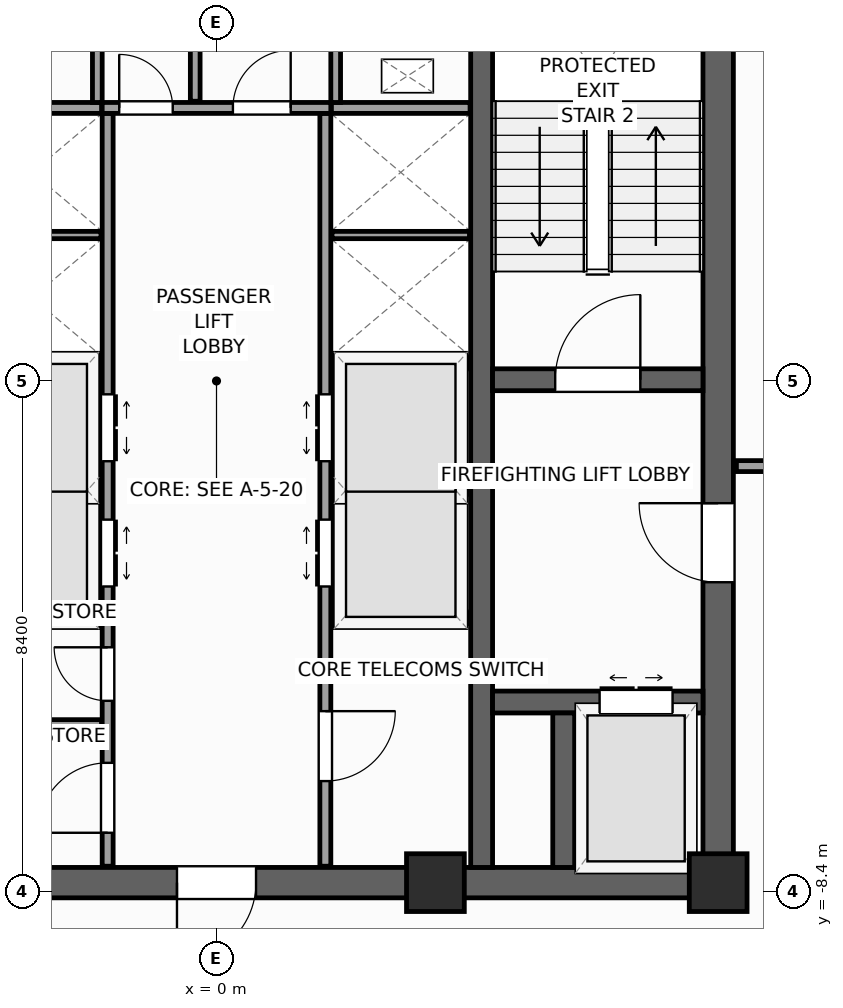
"""IFC4 building model, lengths in metres.
Left out: names, types, materials, properties, quantities, classifications, styles, units other than length and angle.
Written with IfcOpenShell. Run it as: python <this file> out.ifc"""

import sys

from ifc_helpers import new_model, si_unit, direction, frame, frame_2d, origin, origin_2d, place, context, subcontext, project, spatial, rectangle, extrude, source, transform, mapped, element, fill, save


model = new_model("IFC4")
c1 = context("Model", 3, precision=1e-05, world=origin(), true_north=direction((0.0, 1.0)))
c2 = subcontext(c1, "Body", "Model", "MODEL_VIEW")
j1 = project(units=[si_unit("LENGTHUNIT", "METRE"), si_unit("PLANEANGLEUNIT", "RADIAN")], contexts=[c1])
p1 = place(None, origin())
s1 = spatial("IfcSite", under=j1, at=p1, CompositionType="ELEMENT")
p2 = place(p1, origin())
s2 = spatial("IfcBuilding", under=s1, at=p2, CompositionType="ELEMENT")
p3 = place(p2, frame((0.0, 0.0, 221.2)))
s3 = spatial("IfcBuildingStorey", under=s2, at=p3, CompositionType="ELEMENT", Elevation=221.2)
p4 = place(p3, frame((-8.5, -8.25, 0.0), z_axis=(0.0, 0.0, 1.0), x_axis=(1.0, 0.0, 0.0)))
e1 = element("IfcWall", 1, at=p4, inside=s3, PredefinedType="SHEAR", context=c2, shape_type="SweptSolid", body=[
    extrude(rectangle(XDim=17.0, YDim=0.5, at=frame_2d((8.5, 0.0))), origin(), (0.0, 0.0, 1.0), 3.9),
])
p5 = place(p4, frame((7.85, 0.0, 0.0)))
e2 = element("IfcOpeningElement", 2, at=p5, cuts=e1, PredefinedType="OPENING", context=c2, shape_type="SweptSolid", body=[
    extrude(rectangle(XDim=1.3, YDim=2.2, at=frame_2d((0.65, 1.1))), frame((0.0, 0.26, 0.0), z_axis=(0.0, -1.0, 0.0), x_axis=(1.0, 0.0, 0.0)), (0.0, 0.0, 1.0), 0.52),
])
p6 = place(p3, frame((8.25, -8.0, 0.0), z_axis=(0.0, 0.0, 1.0), x_axis=(0.0, 1.0, 0.0)))
e3 = element("IfcWall", 3, at=p6, inside=s3, PredefinedType="SHEAR", context=c2, shape_type="SweptSolid", body=[
    extrude(rectangle(XDim=16.0, YDim=0.5, at=frame_2d((8.0, 0.0))), origin(), (0.0, 0.0, 1.0), 3.9),
])
p7 = place(p6, frame((4.69, 0.0, 0.0)))
e4 = element("IfcOpeningElement", 4, at=p7, cuts=e3, PredefinedType="OPENING", context=c2, shape_type="SweptSolid", body=[
    extrude(rectangle(XDim=1.3, YDim=2.2, at=frame_2d((0.65, 1.1))), frame((0.0, 0.26, 0.0), z_axis=(0.0, -1.0, 0.0), x_axis=(1.0, 0.0, 0.0)), (0.0, 0.0, 1.0), 0.52),
])
p8 = place(p3, frame((4.36, -8.0, 0.0), z_axis=(0.0, 0.0, 1.0), x_axis=(0.0, 1.0, 0.0)))
e5 = element("IfcWall", 5, at=p8, inside=s3, PredefinedType="SHEAR", context=c2, shape_type="SweptSolid", body=[
    extrude(rectangle(XDim=16.0, YDim=0.36, at=frame_2d((8.0, 0.0))), origin(), (0.0, 0.0, 1.0), 3.9),
])
p9 = place(p3, frame((4.54, 0.02, 0.0), z_axis=(0.0, 0.0, 1.0), x_axis=(1.0, 0.0, 0.0)))
e6 = element("IfcWall", 6, at=p9, inside=s3, PredefinedType="SHEAR", context=c2, shape_type="SweptSolid", body=[
    extrude(rectangle(XDim=3.46, YDim=0.36, at=frame_2d((1.73, 0.0))), origin(), (0.0, 0.0, 1.0), 3.9),
])
p10 = place(p9, frame((1.03, 0.0, 0.0)))
e7 = element("IfcOpeningElement", 7, at=p10, cuts=e6, PredefinedType="OPENING", context=c2, shape_type="SweptSolid", body=[
    extrude(rectangle(XDim=1.4, YDim=2.2, at=frame_2d((0.7, 1.1))), frame((0.0, 0.19, 0.0), z_axis=(0.0, -1.0, 0.0), x_axis=(1.0, 0.0, 0.0)), (0.0, 0.0, 1.0), 0.38),
])
p11 = place(p3, frame((4.54, -5.28, 0.0), z_axis=(0.0, 0.0, 1.0), x_axis=(1.0, 0.0, 0.0)))
e8 = element("IfcWall", 8, at=p11, inside=s3, PredefinedType="SHEAR", context=c2, shape_type="SweptSolid", body=[
    extrude(rectangle(XDim=3.46, YDim=0.36, at=frame_2d((1.73, 0.0))), origin(), (0.0, 0.0, 1.0), 3.9),
])
p12 = place(p11, frame((1.76, 0.0, 0.0)))
e9 = element("IfcOpeningElement", 9, at=p12, cuts=e8, PredefinedType="OPENING", context=c2, shape_type="SweptSolid", body=[
    extrude(rectangle(XDim=1.2, YDim=2.25, at=frame_2d((0.6, 1.125))), frame((0.0, 0.19, 0.0), z_axis=(0.0, -1.0, 0.0), x_axis=(1.0, 0.0, 0.0)), (0.0, 0.0, 1.0), 0.38),
])
p13 = place(p3, frame((5.71, -8.0, 0.0), z_axis=(0.0, 0.0, 1.0), x_axis=(0.0, 1.0, 0.0)))
e10 = element("IfcWall", 10, at=p13, inside=s3, PredefinedType="SHEAR", context=c2, shape_type="SweptSolid", body=[
    extrude(rectangle(XDim=2.54, YDim=0.36, at=frame_2d((1.27, 0.0))), origin(), (0.0, 0.0, 1.0), 3.9),
])
m1 = source(origin(), c2, "Body", "SweptSolid", [
    extrude(rectangle(XDim=0.95, YDim=0.95, at=origin_2d()), origin(), (0.0, 0.0, 1.0), 3.9),
])
for number, where, z_axis, x_axis in (
    (11, (8.25, -8.25, 0.0), (0.0, 0.0, 1.0), (1.0, 0.0, 0.0)),
    (12, (3.6, -8.25, 0.0), (0.0, 0.0, 1.0), (1.0, 0.0, 0.0)),
):
    element("IfcColumn", number, at=place(p3, frame(where, z_axis=z_axis, x_axis=x_axis)), inside=s3, PredefinedType="PILASTER", context=c2, shape_type="MappedRepresentation", body=[
        mapped(m1, transform((0.0, 0.0, 0.0), scale=1.0)),
    ])
p14 = place(p3, frame((6.733, -29.154, 0.0), z_axis=(0.0, 0.0, 1.0), x_axis=(0.629325378072, 0.77714192302, 0.0)))
e13 = element("IfcWall", 13, at=p14, inside=s3, PredefinedType="STANDARD", context=c2, shape_type="SweptSolid", body=[
    extrude(rectangle(XDim=36.84, YDim=0.34, at=frame_2d((18.42, 0.0))), origin(), (0.0, 0.0, 1.0), 2.96),
])
p15 = place(p14, frame((23.495, 0.0, 0.0)))
e14 = element("IfcOpeningElement", 14, at=p15, cuts=e13, PredefinedType="OPENING", context=c2, shape_type="SweptSolid", body=[
    extrude(rectangle(XDim=1.05, YDim=2.25, at=frame_2d((0.525, 1.125))), frame((0.0, 0.18, 0.0), z_axis=(0.0, -1.0, 0.0), x_axis=(1.0, 0.0, 0.0)), (0.0, 0.0, 1.0), 0.36),
])
p16 = place(p14, frame((3.721, 0.0, 0.48)))
e15 = element("IfcOpeningElement", 15, at=p16, cuts=e13, PredefinedType="OPENING", context=c2, shape_type="SweptSolid", body=[
    extrude(rectangle(XDim=1.4, YDim=2.4, at=frame_2d((0.7, 1.2))), frame((0.0, 0.18, 0.0), z_axis=(0.0, -1.0, 0.0), x_axis=(1.0, 0.0, 0.0)), (0.0, 0.0, 1.0), 0.36),
])
p17 = place(p14, frame((10.559, 0.0, 0.58)))
e16 = element("IfcOpeningElement", 16, at=p17, cuts=e13, PredefinedType="OPENING", context=c2, shape_type="SweptSolid", body=[
    extrude(rectangle(XDim=1.75, YDim=2.3, at=frame_2d((0.875, 1.15))), frame((0.0, 0.18, 0.0), z_axis=(0.0, -1.0, 0.0), x_axis=(1.0, 0.0, 0.0)), (0.0, 0.0, 1.0), 0.36),
])
p18 = place(p14, frame((16.058, 0.0, 0.58)))
e17 = element("IfcOpeningElement", 17, at=p18, cuts=e13, PredefinedType="OPENING", context=c2, shape_type="SweptSolid", body=[
    extrude(rectangle(XDim=1.75, YDim=2.3, at=frame_2d((0.875, 1.15))), frame((0.0, 0.18, 0.0), z_axis=(0.0, -1.0, 0.0), x_axis=(1.0, 0.0, 0.0)), (0.0, 0.0, 1.0), 0.36),
])
p19 = place(p14, frame((25.676, 0.0, 0.58)))
e18 = element("IfcOpeningElement", 18, at=p19, cuts=e13, PredefinedType="OPENING", context=c2, shape_type="SweptSolid", body=[
    extrude(rectangle(XDim=1.75, YDim=2.3, at=frame_2d((0.875, 1.15))), frame((0.0, 0.18, 0.0), z_axis=(0.0, -1.0, 0.0), x_axis=(1.0, 0.0, 0.0)), (0.0, 0.0, 1.0), 0.36),
])
p20 = place(p14, frame((31.732, 0.0, 0.48)))
e19 = element("IfcOpeningElement", 19, at=p20, cuts=e13, PredefinedType="OPENING", context=c2, shape_type="SweptSolid", body=[
    extrude(rectangle(XDim=1.4, YDim=2.4, at=frame_2d((0.7, 1.2))), frame((0.0, 0.18, 0.0), z_axis=(0.0, -1.0, 0.0), x_axis=(1.0, 0.0, 0.0)), (0.0, 0.0, 1.0), 0.36),
])
p21 = place(p3, frame((-29.154, -6.733, 0.0), z_axis=(0.0, 0.0, 1.0), x_axis=(0.77714192302, -0.629325378072, 0.0)))
e20 = element("IfcWall", 20, at=p21, inside=s3, PredefinedType="STANDARD", context=c2, shape_type="SweptSolid", body=[
    extrude(rectangle(XDim=36.84, YDim=0.34, at=frame_2d((18.42, 0.0))), origin(), (0.0, 0.0, 1.0), 2.96),
])
p22 = place(p21, frame((3.721, 0.0, 0.48)))
e21 = element("IfcOpeningElement", 21, at=p22, cuts=e20, PredefinedType="OPENING", context=c2, shape_type="SweptSolid", body=[
    extrude(rectangle(XDim=1.4, YDim=2.4, at=frame_2d((0.7, 1.2))), frame((0.0, 0.18, 0.0), z_axis=(0.0, -1.0, 0.0), x_axis=(1.0, 0.0, 0.0)), (0.0, 0.0, 1.0), 0.36),
])
p23 = place(p21, frame((9.809, 0.0, 0.58)))
e22 = element("IfcOpeningElement", 22, at=p23, cuts=e20, PredefinedType="OPENING", context=c2, shape_type="SweptSolid", body=[
    extrude(rectangle(XDim=1.75, YDim=2.3, at=frame_2d((0.875, 1.15))), frame((0.0, 0.18, 0.0), z_axis=(0.0, -1.0, 0.0), x_axis=(1.0, 0.0, 0.0)), (0.0, 0.0, 1.0), 0.36),
])
p24 = place(p21, frame((16.058, 0.0, 0.58)))
e23 = element("IfcOpeningElement", 23, at=p24, cuts=e20, PredefinedType="OPENING", context=c2, shape_type="SweptSolid", body=[
    extrude(rectangle(XDim=1.75, YDim=2.3, at=frame_2d((0.875, 1.15))), frame((0.0, 0.18, 0.0), z_axis=(0.0, -1.0, 0.0), x_axis=(1.0, 0.0, 0.0)), (0.0, 0.0, 1.0), 0.36),
])
p25 = place(p21, frame((24.176, 0.0, 0.58)))
e24 = element("IfcOpeningElement", 24, at=p25, cuts=e20, PredefinedType="OPENING", context=c2, shape_type="SweptSolid", body=[
    extrude(rectangle(XDim=1.75, YDim=2.3, at=frame_2d((0.875, 1.15))), frame((0.0, 0.18, 0.0), z_axis=(0.0, -1.0, 0.0), x_axis=(1.0, 0.0, 0.0)), (0.0, 0.0, 1.0), 0.36),
])
p26 = place(p21, frame((30.232, 0.0, 0.48)))
e25 = element("IfcOpeningElement", 25, at=p26, cuts=e20, PredefinedType="OPENING", context=c2, shape_type="SweptSolid", body=[
    extrude(rectangle(XDim=1.4, YDim=2.4, at=frame_2d((0.7, 1.2))), frame((0.0, 0.18, 0.0), z_axis=(0.0, -1.0, 0.0), x_axis=(1.0, 0.0, 0.0)), (0.0, 0.0, 1.0), 0.36),
])
p27 = place(p3, frame((-1.79, -7.98, 0.0), z_axis=(0.0, 0.0, 1.0), x_axis=(0.0, 1.0, 0.0)))
e26 = element("IfcWall", 26, at=p27, inside=s3, PredefinedType="PARTITIONING", context=c2, shape_type="SweptSolid", body=[
    extrude(rectangle(XDim=12.38, YDim=0.18, at=frame_2d((6.19, 0.0))), origin(), (0.0, 0.0, 1.0), 3.66),
])
p28 = place(p27, frame((4.6, 0.0, 0.0)))
e27 = element("IfcOpeningElement", 27, at=p28, cuts=e26, PredefinedType="OPENING", context=c2, shape_type="SweptSolid", body=[
    extrude(rectangle(XDim=1.1, YDim=2.2, at=frame_2d((0.55, 1.1))), frame((0.0, 0.1, 0.0), z_axis=(0.0, -1.0, 0.0), x_axis=(1.0, 0.0, 0.0)), (0.0, 0.0, 1.0), 0.2),
])
p29 = place(p27, frame((6.66, 0.0, 0.0)))
e28 = element("IfcOpeningElement", 28, at=p29, cuts=e26, PredefinedType="OPENING", context=c2, shape_type="SweptSolid", body=[
    extrude(rectangle(XDim=1.1, YDim=2.2, at=frame_2d((0.55, 1.1))), frame((0.0, 0.1, 0.0), z_axis=(0.0, -1.0, 0.0), x_axis=(1.0, 0.0, 0.0)), (0.0, 0.0, 1.0), 0.2),
])
p30 = place(p27, frame((0.55, 0.0, 0.0)))
e29 = element("IfcOpeningElement", 29, at=p30, cuts=e26, PredefinedType="OPENING", context=c2, shape_type="SweptSolid", body=[
    extrude(rectangle(XDim=1.15, YDim=2.25, at=frame_2d((0.575, 1.125))), frame((0.0, 0.1, 0.0), z_axis=(0.0, -1.0, 0.0), x_axis=(1.0, 0.0, 0.0)), (0.0, 0.0, 1.0), 0.2),
])
p31 = place(p27, frame((2.72, 0.0, 0.0)))
e30 = element("IfcOpeningElement", 30, at=p31, cuts=e26, PredefinedType="OPENING", context=c2, shape_type="SweptSolid", body=[
    extrude(rectangle(XDim=0.88, YDim=2.1, at=frame_2d((0.44, 1.05))), frame((0.0, 0.1, 0.0), z_axis=(0.0, -1.0, 0.0), x_axis=(1.0, 0.0, 0.0)), (0.0, 0.0, 1.0), 0.2),
])
p32 = place(p3, frame((1.79, -7.98, 0.0), z_axis=(0.0, 0.0, 1.0), x_axis=(0.0, 1.0, 0.0)))
e31 = element("IfcWall", 31, at=p32, inside=s3, PredefinedType="PARTITIONING", context=c2, shape_type="SweptSolid", body=[
    extrude(rectangle(XDim=12.38, YDim=0.18, at=frame_2d((6.19, 0.0))), origin(), (0.0, 0.0, 1.0), 3.66),
])
p33 = place(p32, frame((4.6, 0.0, 0.0)))
e32 = element("IfcOpeningElement", 32, at=p33, cuts=e31, PredefinedType="OPENING", context=c2, shape_type="SweptSolid", body=[
    extrude(rectangle(XDim=1.1, YDim=2.2, at=frame_2d((0.55, 1.1))), frame((0.0, 0.1, 0.0), z_axis=(0.0, -1.0, 0.0), x_axis=(1.0, 0.0, 0.0)), (0.0, 0.0, 1.0), 0.2),
])
p34 = place(p32, frame((6.66, 0.0, 0.0)))
e33 = element("IfcOpeningElement", 33, at=p34, cuts=e31, PredefinedType="OPENING", context=c2, shape_type="SweptSolid", body=[
    extrude(rectangle(XDim=1.1, YDim=2.2, at=frame_2d((0.55, 1.1))), frame((0.0, 0.1, 0.0), z_axis=(0.0, -1.0, 0.0), x_axis=(1.0, 0.0, 0.0)), (0.0, 0.0, 1.0), 0.2),
])
p35 = place(p32, frame((1.4, 0.0, 0.0)))
e34 = element("IfcOpeningElement", 34, at=p35, cuts=e31, PredefinedType="OPENING", context=c2, shape_type="SweptSolid", body=[
    extrude(rectangle(XDim=1.15, YDim=2.25, at=frame_2d((0.575, 1.125))), frame((0.0, 0.1, 0.0), z_axis=(0.0, -1.0, 0.0), x_axis=(1.0, 0.0, 0.0)), (0.0, 0.0, 1.0), 0.2),
])
p36 = place(p3, frame((-1.88, 4.49, 0.0), z_axis=(0.0, 0.0, 1.0), x_axis=(1.0, 0.0, 0.0)))
e35 = element("IfcWall", 35, at=p36, inside=s3, PredefinedType="PARTITIONING", context=c2, shape_type="SweptSolid", body=[
    extrude(rectangle(XDim=3.76, YDim=0.18, at=frame_2d((1.88, 0.0))), origin(), (0.0, 0.0, 1.0), 3.66),
])
p37 = place(p36, frame((0.28, 0.0, 0.0)))
e36 = element("IfcOpeningElement", 36, at=p37, cuts=e35, PredefinedType="OPENING", context=c2, shape_type="SweptSolid", body=[
    extrude(rectangle(XDim=0.88, YDim=2.1, at=frame_2d((0.44, 1.05))), frame((0.0, 0.1, 0.0), z_axis=(0.0, -1.0, 0.0), x_axis=(1.0, 0.0, 0.0)), (0.0, 0.0, 1.0), 0.2),
])
p38 = place(p36, frame((2.15, 0.0, 0.0)))
e37 = element("IfcOpeningElement", 37, at=p38, cuts=e35, PredefinedType="OPENING", context=c2, shape_type="SweptSolid", body=[
    extrude(rectangle(XDim=0.95, YDim=2.1, at=frame_2d((0.475, 1.05))), frame((0.0, 0.1, 0.0), z_axis=(0.0, -1.0, 0.0), x_axis=(1.0, 0.0, 0.0)), (0.0, 0.0, 1.0), 0.2),
])
for number, where, z_axis, x_axis in (
    (38, (-4.17, -3.9, 0.0), (0.0, 0.0, 1.0), (1.0, 0.0, 0.0)),
    (39, (1.89, -3.9, 0.0), (0.0, 0.0, 1.0), (1.0, 0.0, 0.0)),
    (40, (-4.17, 0.3, 0.0), (0.0, 0.0, 1.0), (1.0, 0.0, 0.0)),
    (41, (1.89, 0.3, 0.0), (0.0, 0.0, 1.0), (1.0, 0.0, 0.0)),
    (42, (-4.17, 4.49, 0.0), (0.0, 0.0, 1.0), (1.0, 0.0, 0.0)),
    (43, (1.89, 4.49, 0.0), (0.0, 0.0, 1.0), (1.0, 0.0, 0.0)),
):
    element("IfcWall", number, at=place(p3, frame(where, z_axis=z_axis, x_axis=x_axis)), inside=s3, PredefinedType="PARTITIONING", context=c2, shape_type="SweptSolid", body=[
        extrude(rectangle(XDim=2.28, YDim=0.18, at=frame_2d((1.14, 0.0))), origin(), (0.0, 0.0, 1.0), 3.66),
    ])
for number, where, z_axis, x_axis in (
    (44, (-4.16, -1.8, 0.0), (0.0, 0.0, 1.0), (1.0, 0.0, 0.0)),
    (45, (1.9, -1.8, 0.0), (0.0, 0.0, 1.0), (1.0, 0.0, 0.0)),
    (46, (-4.16, 2.4, 0.0), (0.0, 0.0, 1.0), (1.0, 0.0, 0.0)),
    (47, (1.9, 2.4, 0.0), (0.0, 0.0, 1.0), (1.0, 0.0, 0.0)),
):
    element("IfcWall", number, at=place(p3, frame(where, z_axis=z_axis, x_axis=x_axis)), inside=s3, PredefinedType="PARTITIONING", context=c2, shape_type="SweptSolid", body=[
        extrude(rectangle(XDim=2.26, YDim=0.12, at=frame_2d((1.13, 0.0))), origin(), (0.0, 0.0, 1.0), 3.66),
    ])
p39 = place(p3, frame((-4.17, -5.65, 0.0), z_axis=(0.0, 0.0, 1.0), x_axis=(1.0, 0.0, 0.0)))
e48 = element("IfcWall", 48, at=p39, inside=s3, PredefinedType="PARTITIONING", context=c2, shape_type="SweptSolid", body=[
    extrude(rectangle(XDim=2.28, YDim=0.16, at=frame_2d((1.14, 0.0))), origin(), (0.0, 0.0, 1.0), 3.66),
])
for number, where, z_axis, x_axis in (
    (49, (-1.96, 4.58, 0.0), (0.0, 0.0, 1.0), (0.0, 1.0, 0.0)),
    (50, (1.96, 4.58, 0.0), (0.0, 0.0, 1.0), (0.0, 1.0, 0.0)),
):
    element("IfcWall", number, at=place(p3, frame(where, z_axis=z_axis, x_axis=x_axis)), inside=s3, PredefinedType="PARTITIONING", context=c2, shape_type="SweptSolid", body=[
        extrude(rectangle(XDim=3.4, YDim=0.16, at=frame_2d((1.7, 0.0))), origin(), (0.0, 0.0, 1.0), 3.66),
    ])
p40 = place(p3, frame((-0.35, 4.6, 0.0), z_axis=(0.0, 0.0, 1.0), x_axis=(0.0, 1.0, 0.0)))
e51 = element("IfcWall", 51, at=p40, inside=s3, PredefinedType="PARTITIONING", context=c2, shape_type="SweptSolid", body=[
    extrude(rectangle(XDim=3.38, YDim=0.16, at=frame_2d((1.69, 0.0))), origin(), (0.0, 0.0, 1.0), 3.66),
])
p41 = place(p3, frame((8.55, -1.4, 0.0), z_axis=(0.0, 0.0, 1.0), x_axis=(1.0, 0.0, 0.0)))
e52 = element("IfcWall", 52, at=p41, inside=s3, PredefinedType="PARTITIONING", context=c2, shape_type="SweptSolid", body=[
    extrude(rectangle(XDim=2.8, YDim=0.18, at=frame_2d((1.4, 0.0))), origin(), (0.0, 0.0, 1.0), 3.66),
])
p42 = place(p41, frame((0.85, 0.0, 0.0)))
e53 = element("IfcOpeningElement", 53, at=p42, cuts=e52, PredefinedType="OPENING", context=c2, shape_type="SweptSolid", body=[
    extrude(rectangle(XDim=1.1, YDim=2.2, at=frame_2d((0.55, 1.1))), frame((0.0, 0.1, 0.0), z_axis=(0.0, -1.0, 0.0), x_axis=(1.0, 0.0, 0.0)), (0.0, 0.0, 1.0), 0.2),
])
m2 = source(origin(), c2, "Body", "SweptSolid", [
    extrude(rectangle(XDim=1.4, YDim=2.2, at=frame_2d((0.7, 1.1))), frame((0.0, 0.025, 0.0), z_axis=(0.0, -1.0, 0.0), x_axis=(1.0, 0.0, 0.0)), (0.0, 0.0, 1.0), 0.05),
])
p43 = place(p10, origin())
e54 = element("IfcDoor", 54, at=p43, inside=s3, OperationType="SINGLE_SWING_RIGHT", PredefinedType="DOOR", context=c2, shape_type="MappedRepresentation", body=[
    mapped(m2, transform((0.0, 0.0, 0.0), scale=1.0)),
])
fill(e7, e54)
m3 = source(origin(), c2, "Body", "SweptSolid", [
    extrude(rectangle(XDim=1.3, YDim=2.2, at=frame_2d((0.65, 1.1))), frame((0.0, 0.025, 0.0), z_axis=(0.0, -1.0, 0.0), x_axis=(1.0, 0.0, 0.0)), (0.0, 0.0, 1.0), 0.05),
])
p44 = place(p7, origin())
e55 = element("IfcDoor", 55, at=p44, inside=s3, OperationType="SINGLE_SWING_RIGHT", PredefinedType="DOOR", context=c2, shape_type="MappedRepresentation", body=[
    mapped(m3, transform((0.0, 0.0, 0.0), scale=1.0)),
])
fill(e4, e55)
p45 = place(p5, frame((1.3, 0.0, 0.0), z_axis=(0.0, 0.0, 1.0), x_axis=(-1.0, 0.0, 0.0)))
e56 = element("IfcDoor", 56, at=p45, inside=s3, OperationType="SINGLE_SWING_LEFT", PredefinedType="DOOR", context=c2, shape_type="MappedRepresentation", body=[
    mapped(m3, transform((0.0, 0.0, 0.0), scale=1.0)),
])
fill(e2, e56)
m4 = source(origin(), c2, "Body", "SweptSolid", [
    extrude(rectangle(XDim=1.2, YDim=2.25, at=frame_2d((0.6, 1.125))), frame((0.0, 0.025, 0.0), z_axis=(0.0, -1.0, 0.0), x_axis=(1.0, 0.0, 0.0)), (0.0, 0.0, 1.0), 0.05),
])
p46 = place(p12, origin())
e57 = element("IfcDoor", 57, at=p46, inside=s3, OperationType="DOUBLE_DOOR_SLIDING", PredefinedType="DOOR", context=c2, shape_type="MappedRepresentation", body=[
    mapped(m4, transform((0.0, 0.0, 0.0), scale=1.0)),
])
fill(e9, e57)
m5 = source(origin(), c2, "Body", "SweptSolid", [
    extrude(rectangle(XDim=1.1, YDim=2.2, at=frame_2d((0.55, 1.1))), frame((0.0, 0.025, 0.0), z_axis=(0.0, -1.0, 0.0), x_axis=(1.0, 0.0, 0.0)), (0.0, 0.0, 1.0), 0.05),
])
p47 = place(p28, frame((1.1, 0.0, 0.0), z_axis=(0.0, 0.0, 1.0), x_axis=(-1.0, 0.0, 0.0)))
e58 = element("IfcDoor", 58, at=p47, inside=s3, OperationType="DOUBLE_DOOR_SLIDING", PredefinedType="DOOR", context=c2, shape_type="MappedRepresentation", body=[
    mapped(m5, transform((0.0, 0.0, 0.0), scale=1.0)),
])
fill(e27, e58)
p48 = place(p29, frame((1.1, 0.0, 0.0), z_axis=(0.0, 0.0, 1.0), x_axis=(-1.0, 0.0, 0.0)))
e59 = element("IfcDoor", 59, at=p48, inside=s3, OperationType="DOUBLE_DOOR_SLIDING", PredefinedType="DOOR", context=c2, shape_type="MappedRepresentation", body=[
    mapped(m5, transform((0.0, 0.0, 0.0), scale=1.0)),
])
fill(e28, e59)
p49 = place(p33, origin())
e60 = element("IfcDoor", 60, at=p49, inside=s3, OperationType="DOUBLE_DOOR_SLIDING", PredefinedType="DOOR", context=c2, shape_type="MappedRepresentation", body=[
    mapped(m5, transform((0.0, 0.0, 0.0), scale=1.0)),
])
fill(e32, e60)
p50 = place(p34, origin())
e61 = element("IfcDoor", 61, at=p50, inside=s3, OperationType="DOUBLE_DOOR_SLIDING", PredefinedType="DOOR", context=c2, shape_type="MappedRepresentation", body=[
    mapped(m5, transform((0.0, 0.0, 0.0), scale=1.0)),
])
fill(e33, e61)
m6 = source(origin(), c2, "Body", "SweptSolid", [
    extrude(rectangle(XDim=1.15, YDim=2.25, at=frame_2d((0.575, 1.125))), frame((0.0, 0.025, 0.0), z_axis=(0.0, -1.0, 0.0), x_axis=(1.0, 0.0, 0.0)), (0.0, 0.0, 1.0), 0.05),
])
p51 = place(p30, origin())
e62 = element("IfcDoor", 62, at=p51, inside=s3, OperationType="SINGLE_SWING_LEFT", PredefinedType="DOOR", context=c2, shape_type="MappedRepresentation", body=[
    mapped(m6, transform((0.0, 0.0, 0.0), scale=1.0)),
])
fill(e29, e62)
m7 = source(origin(), c2, "Body", "SweptSolid", [
    extrude(rectangle(XDim=0.88, YDim=2.1, at=frame_2d((0.44, 1.05))), frame((0.0, 0.025, 0.0), z_axis=(0.0, -1.0, 0.0), x_axis=(1.0, 0.0, 0.0)), (0.0, 0.0, 1.0), 0.05),
])
p52 = place(p31, origin())
e63 = element("IfcDoor", 63, at=p52, inside=s3, OperationType="SINGLE_SWING_RIGHT", PredefinedType="DOOR", context=c2, shape_type="MappedRepresentation", body=[
    mapped(m7, transform((0.0, 0.0, 0.0), scale=1.0)),
])
fill(e30, e63)
p53 = place(p35, frame((1.15, 0.0, 0.0), z_axis=(0.0, 0.0, 1.0), x_axis=(-1.0, 0.0, 0.0)))
e64 = element("IfcDoor", 64, at=p53, inside=s3, OperationType="SINGLE_SWING_RIGHT", PredefinedType="DOOR", context=c2, shape_type="MappedRepresentation", body=[
    mapped(m6, transform((0.0, 0.0, 0.0), scale=1.0)),
])
fill(e34, e64)
p54 = place(p37, origin())
e65 = element("IfcDoor", 65, at=p54, inside=s3, OperationType="SINGLE_SWING_LEFT", PredefinedType="DOOR", context=c2, shape_type="MappedRepresentation", body=[
    mapped(m7, transform((0.0, 0.0, 0.0), scale=1.0)),
])
fill(e36, e65)
m8 = source(origin(), c2, "Body", "SweptSolid", [
    extrude(rectangle(XDim=0.95, YDim=2.1, at=frame_2d((0.475, 1.05))), frame((0.0, 0.025, 0.0), z_axis=(0.0, -1.0, 0.0), x_axis=(1.0, 0.0, 0.0)), (0.0, 0.0, 1.0), 0.05),
])
p55 = place(p38, origin())
e66 = element("IfcDoor", 66, at=p55, inside=s3, OperationType="SINGLE_SWING_RIGHT", PredefinedType="DOOR", context=c2, shape_type="MappedRepresentation", body=[
    mapped(m8, transform((0.0, 0.0, 0.0), scale=1.0)),
])
fill(e37, e66)
save(model, sys.argv[1])
